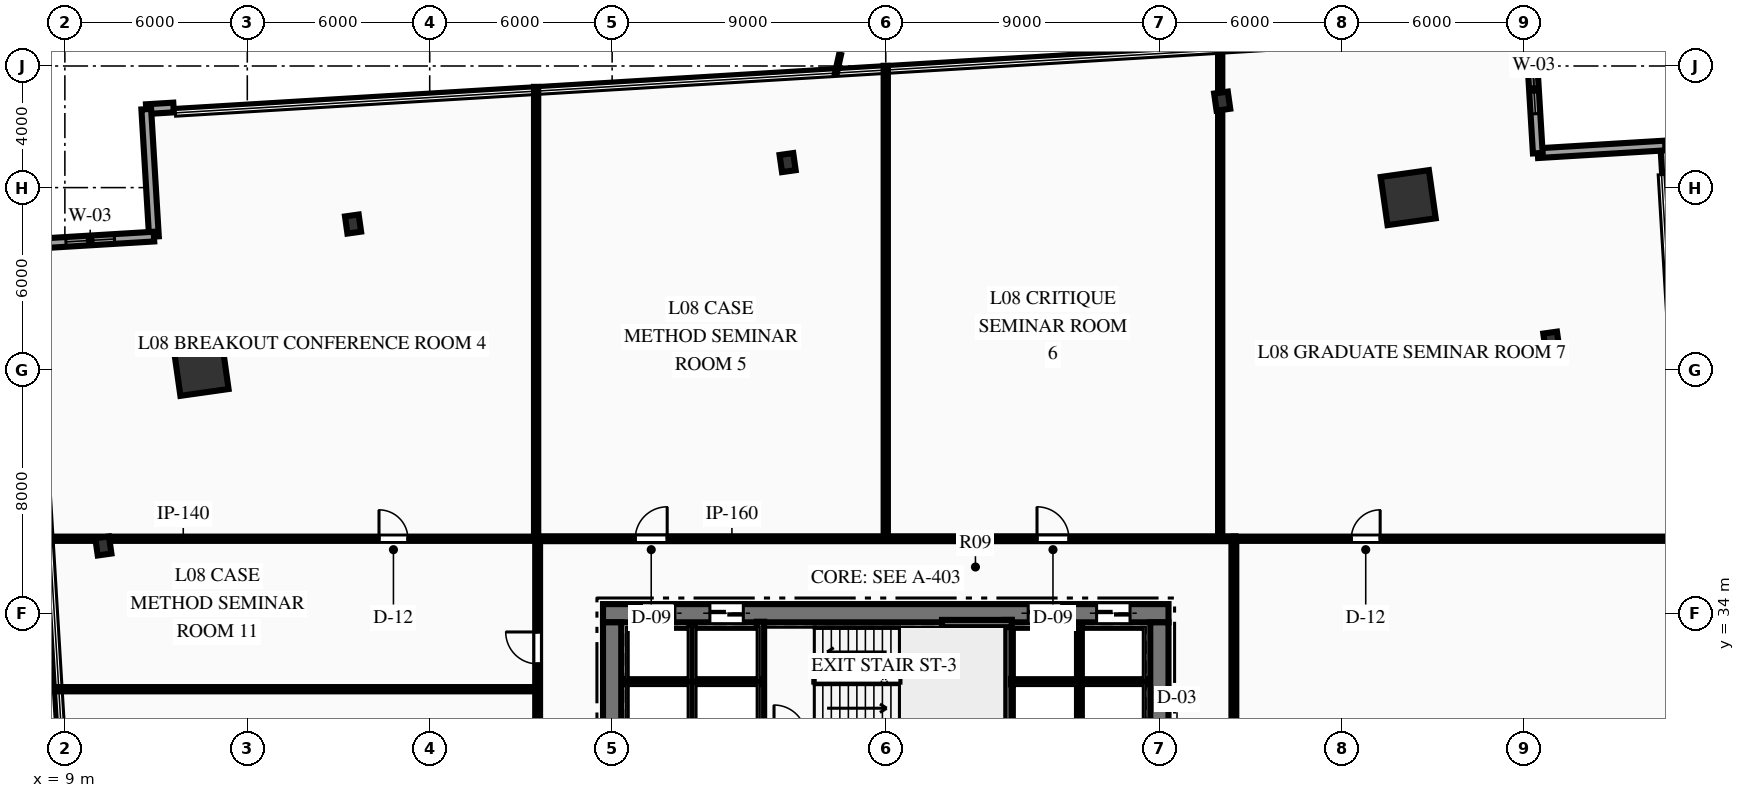
"""IFC4 building model, lengths in metres.
Left out: names, types, materials, properties, quantities, classifications, styles, units other than length and angle.
Written with IfcOpenShell. Run it as: python <this file> out.ifc"""

import sys

from ifc_helpers import new_model, si_unit, direction, frame, frame_2d, origin, origin_2d, place, context, subcontext, project, spatial, rectangle, hollow_rectangle, i_section, extrude, element, fill, save


model = new_model("IFC4")
c1 = context("Model", 3, precision=1e-05, world=origin(), true_north=direction((0.0, 1.0)))
c2 = subcontext(c1, "Body", "Model", "MODEL_VIEW")
j1 = project(units=[si_unit("LENGTHUNIT", "METRE"), si_unit("PLANEANGLEUNIT", "RADIAN")], contexts=[c1])
p1 = place(None, origin())
s1 = spatial("IfcSite", under=j1, at=p1, CompositionType="ELEMENT")
p2 = place(p1, origin())
s2 = spatial("IfcBuilding", under=s1, at=p2, CompositionType="ELEMENT")
p3 = place(p2, frame((0.0, 0.0, 40.2)))
s3 = spatial("IfcBuildingStorey", under=s2, at=p3, CompositionType="ELEMENT", Elevation=40.2)
p4 = place(p3, frame((26.7, 34.0, 0.0), z_axis=(0.0, 0.0, 1.0), x_axis=(1.0, 0.0, 0.0)))
e1 = element("IfcWall", 1, at=p4, inside=s3, PredefinedType="SHEAR", context=c2, shape_type="SweptSolid", body=[
    extrude(rectangle(XDim=18.6, YDim=0.6, at=frame_2d((9.3, 0.0))), origin(), (0.0, 0.0, 1.0), 3.75),
])
p5 = place(p4, frame((1.265, 0.0, 0.0)))
e2 = element("IfcOpeningElement", 2, at=p5, cuts=e1, PredefinedType="OPENING", context=c2, shape_type="SweptSolid", body=[
    extrude(rectangle(XDim=1.1, YDim=2.15, at=frame_2d((0.55, 1.075))), frame((0.0, 0.31, 0.0), z_axis=(0.0, -1.0, 0.0), x_axis=(1.0, 0.0, 0.0)), (0.0, 0.0, 1.0), 0.62),
])
p6 = place(p4, frame((3.515, 0.0, 0.0)))
e3 = element("IfcOpeningElement", 3, at=p6, cuts=e1, PredefinedType="OPENING", context=c2, shape_type="SweptSolid", body=[
    extrude(rectangle(XDim=1.1, YDim=2.15, at=frame_2d((0.55, 1.075))), frame((0.0, 0.31, 0.0), z_axis=(0.0, -1.0, 0.0), x_axis=(1.0, 0.0, 0.0)), (0.0, 0.0, 1.0), 0.62),
])
p7 = place(p4, frame((13.985, 0.0, 0.0)))
e4 = element("IfcOpeningElement", 4, at=p7, cuts=e1, PredefinedType="OPENING", context=c2, shape_type="SweptSolid", body=[
    extrude(rectangle(XDim=1.1, YDim=2.15, at=frame_2d((0.55, 1.075))), frame((0.0, 0.31, 0.0), z_axis=(0.0, -1.0, 0.0), x_axis=(1.0, 0.0, 0.0)), (0.0, 0.0, 1.0), 0.62),
])
p8 = place(p4, frame((16.235, 0.0, 0.0)))
e5 = element("IfcOpeningElement", 5, at=p8, cuts=e1, PredefinedType="OPENING", context=c2, shape_type="SweptSolid", body=[
    extrude(rectangle(XDim=1.1, YDim=2.15, at=frame_2d((0.55, 1.075))), frame((0.0, 0.31, 0.0), z_axis=(0.0, -1.0, 0.0), x_axis=(1.0, 0.0, 0.0)), (0.0, 0.0, 1.0), 0.62),
])
p9 = place(p3, frame((27.0, 18.3, 0.0), z_axis=(0.0, 0.0, 1.0), x_axis=(0.0, 1.0, 0.0)))
e6 = element("IfcWall", 6, at=p9, inside=s3, PredefinedType="SHEAR", context=c2, shape_type="SweptSolid", body=[
    extrude(rectangle(XDim=15.4, YDim=0.6, at=frame_2d((7.7, 0.0))), origin(), (0.0, 0.0, 1.0), 3.75),
])
p10 = place(p9, frame((9.94, 0.0, 0.0)))
e7 = element("IfcOpeningElement", 7, at=p10, cuts=e6, PredefinedType="OPENING", context=c2, shape_type="SweptSolid", body=[
    extrude(rectangle(XDim=1.4, YDim=2.2, at=frame_2d((0.7, 1.1))), frame((0.0, 0.31, 0.0), z_axis=(0.0, -1.0, 0.0), x_axis=(1.0, 0.0, 0.0)), (0.0, 0.0, 1.0), 0.62),
])
p11 = place(p3, frame((45.0, 18.3, 0.0), z_axis=(0.0, 0.0, 1.0), x_axis=(0.0, 1.0, 0.0)))
e8 = element("IfcWall", 8, at=p11, inside=s3, PredefinedType="SHEAR", context=c2, shape_type="SweptSolid", body=[
    extrude(rectangle(XDim=15.4, YDim=0.6, at=frame_2d((7.7, 0.0))), origin(), (0.0, 0.0, 1.0), 3.75),
])
p12 = place(p11, frame((9.94, 0.0, 0.0)))
e9 = element("IfcOpeningElement", 9, at=p12, cuts=e8, PredefinedType="OPENING", context=c2, shape_type="SweptSolid", body=[
    extrude(rectangle(XDim=1.4, YDim=2.2, at=frame_2d((0.7, 1.1))), frame((0.0, 0.31, 0.0), z_axis=(0.0, -1.0, 0.0), x_axis=(1.0, 0.0, 0.0)), (0.0, 0.0, 1.0), 0.62),
])
p13 = place(p3, frame((31.88, 29.93, 0.0), z_axis=(0.0, 0.0, 1.0), x_axis=(0.0, 1.0, 0.0)))
e10 = element("IfcWall", 10, at=p13, inside=s3, PredefinedType="SHEAR", context=c2, shape_type="SweptSolid", body=[
    extrude(rectangle(XDim=3.79, YDim=0.24, at=frame_2d((1.895, 0.0))), origin(), (0.0, 0.0, 1.0), 3.75),
])
p14 = place(p3, frame((40.02, 29.93, 0.0), z_axis=(0.0, 0.0, 1.0), x_axis=(0.0, 1.0, 0.0)))
e11 = element("IfcWall", 11, at=p14, inside=s3, PredefinedType="SHEAR", context=c2, shape_type="SweptSolid", body=[
    extrude(rectangle(XDim=3.85, YDim=0.24, at=frame_2d((1.925, 0.0))), origin(), (0.0, 0.0, 1.0), 3.75),
])
p15 = place(p3, frame((37.85, 33.66, 0.0), z_axis=(0.0, 0.0, 1.0), x_axis=(1.0, 0.0, 0.0)))
e12 = element("IfcWall", 12, at=p15, inside=s3, PredefinedType="SHEAR", context=c2, shape_type="SweptSolid", body=[
    extrude(rectangle(XDim=2.29, YDim=0.24, at=frame_2d((1.145, 0.0))), origin(), (0.0, 0.0, 1.0), 3.75),
])
for number, where, z_axis, x_axis in (
    (13, (53.185, 47.67, 0.0), (0.0, 0.0, 1.0), (0.99, 0.14, 0.0)),
    (14, (13.48, 42.054, 0.0), (0.0, 0.0, 1.0), (0.99, 0.14, 0.0)),
):
    element("IfcColumn", number, at=place(p3, frame(where, z_axis=z_axis, x_axis=x_axis)), inside=s3, PredefinedType="COLUMN", context=c2, shape_type="SweptSolid", body=[
        extrude(hollow_rectangle(XDim=1.6, YDim=1.6, WallThickness=0.08, at=origin_2d()), origin(), (0.0, 0.0, 1.0), 3.75),
    ])
for number, where, z_axis, x_axis in (
    (15, (57.892, 42.949, 0.0), (0.0, 0.0, 1.0), (0.99, 0.14, 0.0)),
    (16, (47.066, 50.844, 0.0), (0.0, 0.0, 1.0), (0.99, 0.14, 0.0)),
    (17, (32.772, 48.823, 0.0), (0.0, 0.0, 1.0), (0.99, 0.14, 0.0)),
    (18, (18.479, 46.801, 0.0), (0.0, 0.0, 1.0), (0.99, 0.14, 0.0)),
    (19, (10.266, 36.213, 0.0), (0.0, 0.0, 1.0), (0.99, 0.14, 0.0)),
):
    element("IfcColumn", number, at=place(p3, frame(where, z_axis=z_axis, x_axis=x_axis)), inside=s3, PredefinedType="COLUMN", context=c2, shape_type="SweptSolid", body=[
        extrude(i_section(OverallWidth=0.454, OverallDepth=0.569, WebThickness=0.078, FlangeThickness=0.125, at=origin_2d()), origin(), (0.0, 0.0, 1.0), 3.75),
    ])
p16 = place(p3, frame((61.639, 49.385, 0.0), z_axis=(0.0, 0.0, 1.0), x_axis=(0.060216615204, -0.998185333119, 0.0)))
e20 = element("IfcWall", 20, at=p16, inside=s3, PredefinedType="STANDARD", context=c2, shape_type="SweptSolid", body=[
    extrude(rectangle(XDim=0.9, YDim=0.32, at=frame_2d((0.45, 0.0))), origin(), (0.0, 0.0, 1.0), 3.44),
])
p17 = place(p3, frame((57.447, 49.133, 0.0), z_axis=(0.0, 0.0, 1.0), x_axis=(0.998188544632, 0.060163355677, 0.0)))
e21 = element("IfcWall", 21, at=p17, inside=s3, PredefinedType="STANDARD", context=c2, shape_type="SweptSolid", body=[
    extrude(rectangle(XDim=4.2, YDim=0.32, at=frame_2d((2.1, 0.0))), origin(), (0.0, 0.0, 1.0), 3.44),
])
p18 = place(p3, frame((57.194, 53.325, 0.0), z_axis=(0.0, 0.0, 1.0), x_axis=(0.060163355677, -0.998188544632, 0.0)))
e22 = element("IfcWall", 22, at=p18, inside=s3, PredefinedType="STANDARD", context=c2, shape_type="SweptSolid", body=[
    extrude(rectangle(XDim=4.2, YDim=0.32, at=frame_2d((2.1, 0.0))), origin(), (0.0, 0.0, 1.0), 3.44),
])
p19 = place(p18, frame((1.3, 0.0, 0.85)))
e23 = element("IfcOpeningElement", 23, at=p19, cuts=e22, PredefinedType="OPENING", context=c2, shape_type="SweptSolid", body=[
    extrude(rectangle(XDim=1.6, YDim=2.1, at=frame_2d((0.8, 1.05))), frame((0.0, 0.17, 0.0), z_axis=(0.0, -1.0, 0.0), x_axis=(1.0, 0.0, 0.0)), (0.0, 0.0, 1.0), 0.34),
])
p20 = place(p3, frame((11.677, 50.581, 0.0), z_axis=(0.0, 0.0, 1.0), x_axis=(0.998185333119, 0.060216615204, 0.0)))
e24 = element("IfcWall", 24, at=p20, inside=s3, PredefinedType="STANDARD", context=c2, shape_type="SweptSolid", body=[
    extrude(rectangle(XDim=0.9, YDim=0.32, at=frame_2d((0.45, 0.0))), origin(), (0.0, 0.0, 1.0), 3.44),
])
p21 = place(p3, frame((11.929, 46.388, 0.0), z_axis=(0.0, 0.0, 1.0), x_axis=(-0.060163355677, 0.998188544632, 0.0)))
e25 = element("IfcWall", 25, at=p21, inside=s3, PredefinedType="STANDARD", context=c2, shape_type="SweptSolid", body=[
    extrude(rectangle(XDim=4.2, YDim=0.32, at=frame_2d((2.1, 0.0))), origin(), (0.0, 0.0, 1.0), 3.44),
])
p22 = place(p3, frame((7.737, 46.136, 0.0), z_axis=(0.0, 0.0, 1.0), x_axis=(0.998188544632, 0.060163355677, 0.0)))
e26 = element("IfcWall", 26, at=p22, inside=s3, PredefinedType="STANDARD", context=c2, shape_type="SweptSolid", body=[
    extrude(rectangle(XDim=4.2, YDim=0.32, at=frame_2d((2.1, 0.0))), origin(), (0.0, 0.0, 1.0), 3.44),
])
p23 = place(p22, frame((1.3, 0.0, 0.85)))
e27 = element("IfcOpeningElement", 27, at=p23, cuts=e26, PredefinedType="OPENING", context=c2, shape_type="SweptSolid", body=[
    extrude(rectangle(XDim=1.6, YDim=2.1, at=frame_2d((0.8, 1.05))), frame((0.0, 0.17, 0.0), z_axis=(0.0, -1.0, 0.0), x_axis=(1.0, 0.0, 0.0)), (0.0, 0.0, 1.0), 0.34),
])
p24 = place(p3, frame((27.45, 31.75, 0.0), z_axis=(0.0, 0.0, 1.0), x_axis=(1.0, 0.0, 0.0)))
e28 = element("IfcWall", 28, at=p24, inside=s3, PredefinedType="PARTITIONING", context=c2, shape_type="SweptSolid", body=[
    extrude(rectangle(XDim=4.43, YDim=0.18, at=frame_2d((2.215, 0.0))), origin(), (0.0, 0.0, 1.0), 3.44),
])
p25 = place(p3, frame((29.63, 29.9, 0.0), z_axis=(0.0, 0.0, 1.0), x_axis=(0.0, 1.0, 0.0)))
e29 = element("IfcWall", 29, at=p25, inside=s3, PredefinedType="PARTITIONING", context=c2, shape_type="SweptSolid", body=[
    extrude(rectangle(XDim=3.75, YDim=0.18, at=frame_2d((1.875, 0.0))), origin(), (0.0, 0.0, 1.0), 3.44),
])
p26 = place(p3, frame((40.12, 31.75, 0.0), z_axis=(0.0, 0.0, 1.0), x_axis=(1.0, 0.0, 0.0)))
e30 = element("IfcWall", 30, at=p26, inside=s3, PredefinedType="PARTITIONING", context=c2, shape_type="SweptSolid", body=[
    extrude(rectangle(XDim=4.43, YDim=0.18, at=frame_2d((2.215, 0.0))), origin(), (0.0, 0.0, 1.0), 3.44),
])
p27 = place(p3, frame((42.37, 29.9, 0.0), z_axis=(0.0, 0.0, 1.0), x_axis=(0.0, 1.0, 0.0)))
e31 = element("IfcWall", 31, at=p27, inside=s3, PredefinedType="PARTITIONING", context=c2, shape_type="SweptSolid", body=[
    extrude(rectangle(XDim=3.75, YDim=0.18, at=frame_2d((1.875, 0.0))), origin(), (0.0, 0.0, 1.0), 3.44),
])
p28 = place(p3, frame((24.5, 36.45, 0.0), z_axis=(0.0, 0.0, 1.0), x_axis=(1.0, 0.0, 0.0)))
e32 = element("IfcWall", 32, at=p28, inside=s3, PredefinedType="PARTITIONING", context=c2, shape_type="SweptSolid", body=[
    extrude(rectangle(XDim=23.0, YDim=0.16, at=frame_2d((11.5, 0.0))), origin(), (0.0, 0.0, 1.0), 3.44),
])
p29 = place(p28, frame((3.261, 0.0, 0.0)))
e33 = element("IfcOpeningElement", 33, at=p29, cuts=e32, PredefinedType="OPENING", context=c2, shape_type="SweptSolid", body=[
    extrude(rectangle(XDim=1.05, YDim=2.15, at=frame_2d((0.525, 1.075))), frame((0.0, 0.09, 0.0), z_axis=(0.0, -1.0, 0.0), x_axis=(1.0, 0.0, 0.0)), (0.0, 0.0, 1.0), 0.18),
])
p30 = place(p28, frame((16.475, 0.0, 0.0)))
e34 = element("IfcOpeningElement", 34, at=p30, cuts=e32, PredefinedType="OPENING", context=c2, shape_type="SweptSolid", body=[
    extrude(rectangle(XDim=1.05, YDim=2.15, at=frame_2d((0.525, 1.075))), frame((0.0, 0.09, 0.0), z_axis=(0.0, -1.0, 0.0), x_axis=(1.0, 0.0, 0.0)), (0.0, 0.0, 1.0), 0.18),
])
p31 = place(p3, frame((24.55, 15.55, 0.0), z_axis=(0.0, 0.0, 1.0), x_axis=(0.0, 1.0, 0.0)))
e35 = element("IfcWall", 35, at=p31, inside=s3, PredefinedType="PARTITIONING", context=c2, shape_type="SweptSolid", body=[
    extrude(rectangle(XDim=20.9, YDim=0.16, at=frame_2d((10.45, 0.0))), origin(), (0.0, 0.0, 1.0), 3.44),
])
p32 = place(p31, frame((2.116, 0.0, 0.0)))
e36 = element("IfcOpeningElement", 36, at=p32, cuts=e35, PredefinedType="OPENING", context=c2, shape_type="SweptSolid", body=[
    extrude(rectangle(XDim=1.05, YDim=2.15, at=frame_2d((0.525, 1.075))), frame((0.0, 0.09, 0.0), z_axis=(0.0, -1.0, 0.0), x_axis=(1.0, 0.0, 0.0)), (0.0, 0.0, 1.0), 0.18),
])
p33 = place(p31, frame((8.625, 0.0, 0.0)))
e37 = element("IfcOpeningElement", 37, at=p33, cuts=e35, PredefinedType="OPENING", context=c2, shape_type="SweptSolid", body=[
    extrude(rectangle(XDim=1.05, YDim=2.15, at=frame_2d((0.525, 1.075))), frame((0.0, 0.09, 0.0), z_axis=(0.0, -1.0, 0.0), x_axis=(1.0, 0.0, 0.0)), (0.0, 0.0, 1.0), 0.18),
])
p34 = place(p31, frame((13.945, 0.0, 0.0)))
e38 = element("IfcOpeningElement", 38, at=p34, cuts=e35, PredefinedType="OPENING", context=c2, shape_type="SweptSolid", body=[
    extrude(rectangle(XDim=1.05, YDim=2.15, at=frame_2d((0.525, 1.075))), frame((0.0, 0.09, 0.0), z_axis=(0.0, -1.0, 0.0), x_axis=(1.0, 0.0, 0.0)), (0.0, 0.0, 1.0), 0.18),
])
p35 = place(p31, frame((16.783, 0.0, 0.0)))
e39 = element("IfcOpeningElement", 39, at=p35, cuts=e35, PredefinedType="OPENING", context=c2, shape_type="SweptSolid", body=[
    extrude(rectangle(XDim=1.05, YDim=2.15, at=frame_2d((0.525, 1.075))), frame((0.0, 0.09, 0.0), z_axis=(0.0, -1.0, 0.0), x_axis=(1.0, 0.0, 0.0)), (0.0, 0.0, 1.0), 0.18),
])
p36 = place(p3, frame((47.45, 15.55, 0.0), z_axis=(0.0, 0.0, 1.0), x_axis=(0.0, 1.0, 0.0)))
e40 = element("IfcWall", 40, at=p36, inside=s3, PredefinedType="PARTITIONING", context=c2, shape_type="SweptSolid", body=[
    extrude(rectangle(XDim=20.9, YDim=0.16, at=frame_2d((10.45, 0.0))), origin(), (0.0, 0.0, 1.0), 3.44),
])
p37 = place(p36, frame((6.163, 0.0, 0.0)))
e41 = element("IfcOpeningElement", 41, at=p37, cuts=e40, PredefinedType="OPENING", context=c2, shape_type="SweptSolid", body=[
    extrude(rectangle(XDim=1.05, YDim=2.15, at=frame_2d((0.525, 1.075))), frame((0.0, 0.09, 0.0), z_axis=(0.0, -1.0, 0.0), x_axis=(1.0, 0.0, 0.0)), (0.0, 0.0, 1.0), 0.18),
])
p38 = place(p3, frame((8.361, 36.45, 0.0), z_axis=(0.0, 0.0, 1.0), x_axis=(1.0, 0.0, 0.0)))
e42 = element("IfcWall", 42, at=p38, inside=s3, PredefinedType="PARTITIONING", context=c2, shape_type="SweptSolid", body=[
    extrude(rectangle(XDim=16.189, YDim=0.14, at=frame_2d((8.094, 0.0))), origin(), (0.0, 0.0, 1.0), 2.739),
])
p39 = place(p38, frame((10.971, 0.0, 0.0)))
e43 = element("IfcOpeningElement", 43, at=p39, cuts=e42, PredefinedType="OPENING", context=c2, shape_type="SweptSolid", body=[
    extrude(rectangle(XDim=0.95, YDim=2.15, at=frame_2d((0.475, 1.075))), frame((0.0, 0.08, 0.0), z_axis=(0.0, -1.0, 0.0), x_axis=(1.0, 0.0, 0.0)), (0.0, 0.0, 1.0), 0.16),
])
p40 = place(p3, frame((47.45, 36.45, 0.0), z_axis=(0.0, 0.0, 1.0), x_axis=(1.0, 0.0, 0.0)))
e44 = element("IfcWall", 44, at=p40, inside=s3, PredefinedType="PARTITIONING", context=c2, shape_type="SweptSolid", body=[
    extrude(rectangle(XDim=14.929, YDim=0.14, at=frame_2d((7.464, 0.0))), origin(), (0.0, 0.0, 1.0), 3.44),
])
p41 = place(p40, frame((3.862, 0.0, 0.0)))
e45 = element("IfcOpeningElement", 45, at=p41, cuts=e44, PredefinedType="OPENING", context=c2, shape_type="SweptSolid", body=[
    extrude(rectangle(XDim=0.95, YDim=2.15, at=frame_2d((0.475, 1.075))), frame((0.0, 0.08, 0.0), z_axis=(0.0, -1.0, 0.0), x_axis=(1.0, 0.0, 0.0)), (0.0, 0.0, 1.0), 0.16),
])
p42 = place(p3, frame((24.5, 36.45, 0.0), z_axis=(0.0, 0.0, 1.0), x_axis=(0.0, 1.0, 0.0)))
e46 = element("IfcWall", 46, at=p42, inside=s3, PredefinedType="PARTITIONING", context=c2, shape_type="SweptSolid", body=[
    extrude(rectangle(XDim=14.864, YDim=0.14, at=frame_2d((7.432, 0.0))), origin(), (0.0, 0.0, 1.0), 3.44),
])
p43 = place(p3, frame((36.0, 36.45, 0.0), z_axis=(0.0, 0.0, 1.0), x_axis=(0.0, 1.0, 0.0)))
e47 = element("IfcWall", 47, at=p43, inside=s3, PredefinedType="PARTITIONING", context=c2, shape_type="SweptSolid", body=[
    extrude(rectangle(XDim=15.557, YDim=0.14, at=frame_2d((7.779, 0.0))), origin(), (0.0, 0.0, 1.0), 3.44),
])
p44 = place(p3, frame((47.0, 36.45, 0.0), z_axis=(0.0, 0.0, 1.0), x_axis=(0.0, 1.0, 0.0)))
e48 = element("IfcWall", 48, at=p44, inside=s3, PredefinedType="PARTITIONING", context=c2, shape_type="SweptSolid", body=[
    extrude(rectangle(XDim=16.22, YDim=0.14, at=frame_2d((8.11, 0.0))), origin(), (0.0, 0.0, 1.0), 2.739),
])
p45 = place(p3, frame((8.659, 31.5, 0.0), z_axis=(0.0, 0.0, 1.0), x_axis=(1.0, 0.0, 0.0)))
e49 = element("IfcWall", 49, at=p45, inside=s3, PredefinedType="PARTITIONING", context=c2, shape_type="SweptSolid", body=[
    extrude(rectangle(XDim=15.891, YDim=0.14, at=frame_2d((7.945, 0.0))), origin(), (0.0, 0.0, 1.0), 3.44),
])
p46 = place(p19, origin())
e50 = element("IfcWindow", 50, at=p46, inside=s3, PartitioningType="SINGLE_PANEL", PredefinedType="WINDOW", context=c2, shape_type="SweptSolid", body=[
    extrude(rectangle(XDim=1.6, YDim=2.1, at=frame_2d((0.8, 1.05))), frame((0.0, 0.03, 0.0), z_axis=(0.0, -1.0, 0.0), x_axis=(1.0, 0.0, 0.0)), (0.0, 0.0, 1.0), 0.06),
])
fill(e23, e50)
p47 = place(p23, origin())
e51 = element("IfcWindow", 51, at=p47, inside=s3, PartitioningType="SINGLE_PANEL", PredefinedType="WINDOW", context=c2, shape_type="SweptSolid", body=[
    extrude(rectangle(XDim=1.6, YDim=2.1, at=frame_2d((0.8, 1.05))), frame((0.0, 0.03, 0.0), z_axis=(0.0, -1.0, 0.0), x_axis=(1.0, 0.0, 0.0)), (0.0, 0.0, 1.0), 0.06),
])
fill(e27, e51)
p48 = place(p39, origin())
e52 = element("IfcDoor", 52, at=p48, inside=s3, OperationType="SINGLE_SWING_LEFT", PredefinedType="DOOR", context=c2, shape_type="SweptSolid", body=[
    extrude(rectangle(XDim=0.95, YDim=2.15, at=frame_2d((0.475, 1.075))), frame((0.0, 0.025, 0.0), z_axis=(0.0, -1.0, 0.0), x_axis=(1.0, 0.0, 0.0)), (0.0, 0.0, 1.0), 0.05),
])
fill(e43, e52)
p49 = place(p29, origin())
e53 = element("IfcDoor", 53, at=p49, inside=s3, OperationType="SINGLE_SWING_RIGHT", PredefinedType="DOOR", context=c2, shape_type="SweptSolid", body=[
    extrude(rectangle(XDim=1.05, YDim=2.15, at=frame_2d((0.525, 1.075))), frame((0.0, 0.025, 0.0), z_axis=(0.0, -1.0, 0.0), x_axis=(1.0, 0.0, 0.0)), (0.0, 0.0, 1.0), 0.05),
])
fill(e33, e53)
p50 = place(p30, origin())
e54 = element("IfcDoor", 54, at=p50, inside=s3, OperationType="SINGLE_SWING_LEFT", PredefinedType="DOOR", context=c2, shape_type="SweptSolid", body=[
    extrude(rectangle(XDim=1.05, YDim=2.15, at=frame_2d((0.525, 1.075))), frame((0.0, 0.025, 0.0), z_axis=(0.0, -1.0, 0.0), x_axis=(1.0, 0.0, 0.0)), (0.0, 0.0, 1.0), 0.05),
])
fill(e34, e54)
p51 = place(p41, origin())
e55 = element("IfcDoor", 55, at=p51, inside=s3, OperationType="SINGLE_SWING_RIGHT", PredefinedType="DOOR", context=c2, shape_type="SweptSolid", body=[
    extrude(rectangle(XDim=0.95, YDim=2.15, at=frame_2d((0.475, 1.075))), frame((0.0, 0.025, 0.0), z_axis=(0.0, -1.0, 0.0), x_axis=(1.0, 0.0, 0.0)), (0.0, 0.0, 1.0), 0.05),
])
fill(e45, e55)
p52 = place(p35, origin())
e56 = element("IfcDoor", 56, at=p52, inside=s3, OperationType="SINGLE_SWING_RIGHT", PredefinedType="DOOR", context=c2, shape_type="SweptSolid", body=[
    extrude(rectangle(XDim=1.05, YDim=2.15, at=frame_2d((0.525, 1.075))), frame((0.0, 0.025, 0.0), z_axis=(0.0, -1.0, 0.0), x_axis=(1.0, 0.0, 0.0)), (0.0, 0.0, 1.0), 0.05),
])
fill(e39, e56)
p53 = place(p5, origin())
e57 = element("IfcDoor", 57, at=p53, inside=s3, OperationType="SLIDING_TO_LEFT", PredefinedType="DOOR", context=c2, shape_type="SweptSolid", body=[
    extrude(rectangle(XDim=1.1, YDim=2.15, at=frame_2d((0.55, 1.075))), frame((0.0, 0.025, 0.0), z_axis=(0.0, -1.0, 0.0), x_axis=(1.0, 0.0, 0.0)), (0.0, 0.0, 1.0), 0.05),
])
fill(e2, e57)
p54 = place(p6, origin())
e58 = element("IfcDoor", 58, at=p54, inside=s3, OperationType="SLIDING_TO_LEFT", PredefinedType="DOOR", context=c2, shape_type="SweptSolid", body=[
    extrude(rectangle(XDim=1.1, YDim=2.15, at=frame_2d((0.55, 1.075))), frame((0.0, 0.025, 0.0), z_axis=(0.0, -1.0, 0.0), x_axis=(1.0, 0.0, 0.0)), (0.0, 0.0, 1.0), 0.05),
])
fill(e3, e58)
p55 = place(p7, origin())
e59 = element("IfcDoor", 59, at=p55, inside=s3, OperationType="SLIDING_TO_LEFT", PredefinedType="DOOR", context=c2, shape_type="SweptSolid", body=[
    extrude(rectangle(XDim=1.1, YDim=2.15, at=frame_2d((0.55, 1.075))), frame((0.0, 0.025, 0.0), z_axis=(0.0, -1.0, 0.0), x_axis=(1.0, 0.0, 0.0)), (0.0, 0.0, 1.0), 0.05),
])
fill(e4, e59)
p56 = place(p8, origin())
e60 = element("IfcDoor", 60, at=p56, inside=s3, OperationType="SLIDING_TO_LEFT", PredefinedType="DOOR", context=c2, shape_type="SweptSolid", body=[
    extrude(rectangle(XDim=1.1, YDim=2.15, at=frame_2d((0.55, 1.075))), frame((0.0, 0.025, 0.0), z_axis=(0.0, -1.0, 0.0), x_axis=(1.0, 0.0, 0.0)), (0.0, 0.0, 1.0), 0.05),
])
fill(e5, e60)
save(model, sys.argv[1])
